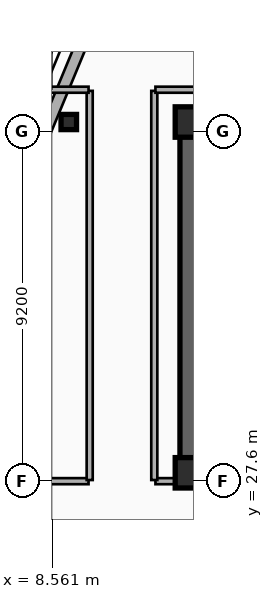
"""IFC4 building model, lengths in metres.
Left out: names, types, materials, properties, quantities, classifications, styles, units other than length and angle.
Written with IfcOpenShell. Run it as: python <this file> out.ifc"""

import sys

from ifc_helpers import new_model, si_unit, direction, frame, frame_2d, origin, origin_2d, place, context, subcontext, project, spatial, rectangle, i_section, extrude, element, save


model = new_model("IFC4")
c1 = context("Model", 3, precision=1e-05, world=origin(), true_north=direction((0.0, 1.0)))
c2 = subcontext(c1, "Body", "Model", "MODEL_VIEW")
j1 = project(units=[si_unit("LENGTHUNIT", "METRE"), si_unit("PLANEANGLEUNIT", "RADIAN")], contexts=[c1])
p1 = place(None, origin())
s1 = spatial("IfcSite", under=j1, at=p1, CompositionType="ELEMENT")
p2 = place(p1, origin())
s2 = spatial("IfcBuilding", under=s1, at=p2, CompositionType="ELEMENT")
p3 = place(p2, frame((0.0, 0.0, 262.1)))
s3 = spatial("IfcBuildingStorey", under=s2, at=p3, CompositionType="ELEMENT", Elevation=262.1)
p4 = place(p3, frame((12.15, 37.05, 0.0), z_axis=(0.0, 0.0, 1.0), x_axis=(1.0, 0.0, 0.0)))
e1 = element("IfcWall", 1, at=p4, inside=s3, PredefinedType="SHEAR", context=c2, shape_type="SweptSolid", body=[
    extrude(rectangle(XDim=33.23, YDim=0.45, at=frame_2d((16.615, 0.0))), origin(), (0.0, 0.0, 1.0), 3.7),
])
p5 = place(p3, frame((21.18, 27.82, 0.0), z_axis=(0.0, 0.0, 1.0), x_axis=(-1.0, 0.0, 0.0)))
e2 = element("IfcWall", 2, at=p5, inside=s3, PredefinedType="SHEAR", context=c2, shape_type="SweptSolid", body=[
    extrude(rectangle(XDim=9.03, YDim=0.45, at=frame_2d((4.515, 0.0))), origin(), (0.0, 0.0, 1.0), 3.7),
])
p6 = place(p5, frame((2.68, 0.0, 0.0)))
e3 = element("IfcOpeningElement", 3, at=p6, cuts=e2, PredefinedType="OPENING", context=c2, shape_type="SweptSolid", body=[
    extrude(rectangle(XDim=1.1, YDim=2.15, at=frame_2d((0.55, 1.075))), frame((0.0, 0.235, 0.0), z_axis=(0.0, -1.0, 0.0), x_axis=(1.0, 0.0, 0.0)), (0.0, 0.0, 1.0), 0.47),
])
p7 = place(p3, frame((12.15, 28.045, 0.0), z_axis=(0.0, 0.0, 1.0), x_axis=(0.0, 1.0, 0.0)))
e4 = element("IfcWall", 4, at=p7, inside=s3, PredefinedType="SHEAR", context=c2, shape_type="SweptSolid", body=[
    extrude(rectangle(XDim=8.78, YDim=0.45, at=frame_2d((4.39, 0.0))), origin(), (0.0, 0.0, 1.0), 3.7),
])
for number, where, z_axis, x_axis in (
    (5, (12.2, 27.82, 0.0), (0.0, 0.0, 1.0), (1.0, 0.0, 0.0)),
    (6, (12.2, 37.05, 0.0), (0.0, 0.0, 1.0), (1.0, 0.0, 0.0)),
):
    element("IfcColumn", number, at=place(p3, frame(where, z_axis=z_axis, x_axis=x_axis)), inside=s3, PredefinedType="COLUMN", context=c2, shape_type="SweptSolid", body=[
        extrude(rectangle(XDim=0.8, YDim=0.8, at=origin_2d()), origin(), (0.0, 0.0, 1.0), 3.7),
    ])
p8 = place(p3, frame((9.0, 37.05, 0.0), z_axis=(0.0, 0.0, 1.0), x_axis=(1.0, 0.0, 0.0)))
e7 = element("IfcColumn", 7, at=p8, inside=s3, PredefinedType="COLUMN", context=c2, shape_type="SweptSolid", body=[
    extrude(i_section(OverallWidth=0.408, OverallDepth=0.4, WebThickness=0.025, FlangeThickness=0.039, FilletRadius=0.015, at=origin_2d()), origin(), (0.0, 0.0, 1.0), 3.7),
])
p9 = place(p3, frame((8.38, 36.8, 0.0), z_axis=(0.0, 0.0, 1.0), x_axis=(0.382704529509, 0.923870793506, 0.0)))
e8 = element("IfcWall", 8, at=p9, inside=s3, PredefinedType="SOLIDWALL", context=c2, shape_type="SweptSolid", body=[
    extrude(rectangle(XDim=3.077, YDim=0.3, at=frame_2d((1.538, 0.0))), origin(), (0.0, 0.0, 1.0), 3.42),
])
p10 = place(p3, frame((8.49, 27.6, 0.0), z_axis=(0.0, 0.0, 1.0), x_axis=(1.0, 0.0, 0.0)))
e9 = element("IfcWall", 9, at=p10, inside=s3, PredefinedType="PARTITIONING", context=c2, shape_type="SweptSolid", body=[
    extrude(rectangle(XDim=1.03, YDim=0.16, at=frame_2d((0.515, 0.0))), origin(), (0.0, 0.0, 1.0), 3.42),
])
p11 = place(p3, frame((11.28, 27.6, 0.0), z_axis=(0.0, 0.0, 1.0), x_axis=(1.0, 0.0, 0.0)))
e10 = element("IfcWall", 10, at=p11, inside=s3, PredefinedType="PARTITIONING", context=c2, shape_type="SweptSolid", body=[
    extrude(rectangle(XDim=0.84, YDim=0.16, at=frame_2d((0.42, 0.0))), origin(), (0.0, 0.0, 1.0), 2.49),
])
for number, where, z_axis, x_axis in (
    (11, (9.55, 27.63, 0.0), (0.0, 0.0, 1.0), (0.0, 1.0, 0.0)),
    (12, (11.25, 27.63, 0.0), (0.0, 0.0, 1.0), (0.0, 1.0, 0.0)),
):
    element("IfcWall", number, at=place(p3, frame(where, z_axis=z_axis, x_axis=x_axis)), inside=s3, PredefinedType="PARTITIONING", context=c2, shape_type="SweptSolid", body=[
        extrude(rectangle(XDim=10.24, YDim=0.16, at=frame_2d((5.12, 0.0))), origin(), (0.0, 0.0, 1.0), 2.9),
    ])
p12 = place(p3, frame((8.49, 37.9, 0.0), z_axis=(0.0, 0.0, 1.0), x_axis=(1.0, 0.0, 0.0)))
e13 = element("IfcWall", 13, at=p12, inside=s3, PredefinedType="PARTITIONING", context=c2, shape_type="SweptSolid", body=[
    extrude(rectangle(XDim=1.03, YDim=0.16, at=frame_2d((0.515, 0.0))), origin(), (0.0, 0.0, 1.0), 3.42),
])
p13 = place(p3, frame((11.28, 37.9, 0.0), z_axis=(0.0, 0.0, 1.0), x_axis=(1.0, 0.0, 0.0)))
e14 = element("IfcWall", 14, at=p13, inside=s3, PredefinedType="PARTITIONING", context=c2, shape_type="SweptSolid", body=[
    extrude(rectangle(XDim=35.04, YDim=0.16, at=frame_2d((17.52, 0.0))), origin(), (0.0, 0.0, 1.0), 3.42),
])
save(model, sys.argv[1])
